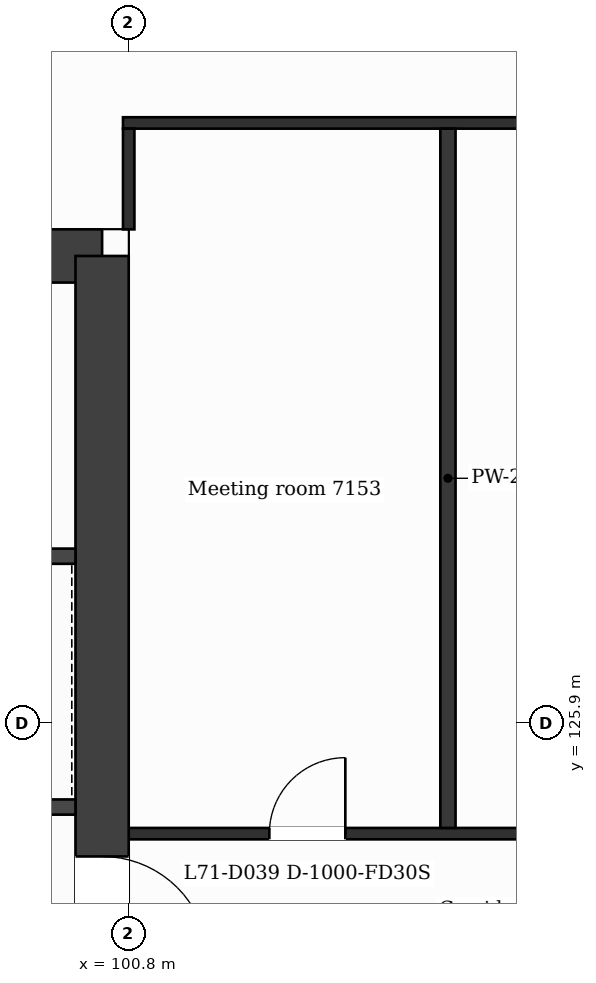
"""IFC4 building model, lengths in metres.
Left out: names, types, materials, properties, quantities, classifications, styles, units other than length and angle.
Written with IfcOpenShell. Run it as: python <this file> out.ifc"""

import sys

from ifc_helpers import new_model, si_unit, direction, frame, frame_2d, origin, place, context, subcontext, project, spatial, rectangle, extrude, element, fill, save


model = new_model("IFC4")
c1 = context("Model", 3, precision=1e-05, world=origin(), true_north=direction((0.0, 1.0)))
c2 = subcontext(c1, "Body", "Model", "MODEL_VIEW")
j1 = project(units=[si_unit("LENGTHUNIT", "METRE"), si_unit("PLANEANGLEUNIT", "RADIAN")], contexts=[c1])
p1 = place(None, origin())
s1 = spatial("IfcSite", under=j1, at=p1, CompositionType="ELEMENT")
p2 = place(p1, origin())
s2 = spatial("IfcBuilding", under=s1, at=p2, CompositionType="ELEMENT")
p3 = place(p2, frame((0.0, 0.0, 292.3)))
s3 = spatial("IfcBuildingStorey", under=s2, at=p3, CompositionType="ELEMENT", Elevation=292.3)
p4 = place(p3, frame((88.937, 132.05, 0.0), z_axis=(0.0, 0.0, 1.0), x_axis=(1.0, 0.0, 0.0)))
e1 = element("IfcWall", 1, at=p4, inside=s3, PredefinedType="SHEAR", context=c2, shape_type="SweptSolid", body=[
    extrude(rectangle(XDim=11.513, YDim=0.7, at=frame_2d((5.757, 0.0))), origin(), (0.0, 0.0, 1.0), 3.7),
])
p5 = place(p4, frame((6.927, 0.0, 0.0)))
e2 = element("IfcOpeningElement", 2, at=p5, cuts=e1, PredefinedType="OPENING", context=c2, shape_type="SweptSolid", body=[
    extrude(rectangle(XDim=1.2, YDim=2.1, at=frame_2d((0.6, 1.05))), frame((0.0, 0.36, 0.0), z_axis=(0.0, -1.0, 0.0), x_axis=(1.0, 0.0, 0.0)), (0.0, 0.0, 1.0), 0.72),
])
p6 = place(p3, frame((100.45, 132.05, 0.0), z_axis=(0.0, 0.0, 1.0), x_axis=(0.0, -1.0, 0.0)))
e3 = element("IfcWall", 3, at=p6, inside=s3, PredefinedType="SHEAR", context=c2, shape_type="SweptSolid", body=[
    extrude(rectangle(XDim=15.7, YDim=0.7, at=frame_2d((7.85, 0.0))), origin(), (0.0, 0.0, 1.0), 3.7),
])
p7 = place(p6, frame((7.9, 0.0, 0.0)))
e4 = element("IfcOpeningElement", 4, at=p7, cuts=e3, PredefinedType="OPENING", context=c2, shape_type="SweptSolid", body=[
    extrude(rectangle(XDim=1.4, YDim=2.1, at=frame_2d((0.7, 1.05))), frame((0.0, 0.36, 0.0), z_axis=(0.0, -1.0, 0.0), x_axis=(1.0, 0.0, 0.0)), (0.0, 0.0, 1.0), 0.72),
])
p8 = place(p3, frame((100.8, 124.45, 0.0), z_axis=(0.0, 0.0, 1.0), x_axis=(1.0, 0.0, 0.0)))
e5 = element("IfcWall", 5, at=p8, inside=s3, PredefinedType="PARTITIONING", context=c2, shape_type="SweptSolid", body=[
    extrude(rectangle(XDim=25.2, YDim=0.15, at=frame_2d((12.6, 0.0))), origin(), (0.0, 0.0, 1.0), 3.38),
])
p9 = place(p8, frame((1.85, 0.0, 0.0)))
e6 = element("IfcOpeningElement", 6, at=p9, cuts=e5, PredefinedType="OPENING", context=c2, shape_type="SweptSolid", body=[
    extrude(rectangle(XDim=1.0, YDim=2.1, at=frame_2d((0.5, 1.05))), frame((0.0, 0.085, 0.0), z_axis=(0.0, -1.0, 0.0), x_axis=(1.0, 0.0, 0.0)), (0.0, 0.0, 1.0), 0.17),
])
p10 = place(p8, frame((6.425, 0.0, 0.0)))
e7 = element("IfcOpeningElement", 7, at=p10, cuts=e5, PredefinedType="OPENING", context=c2, shape_type="SweptSolid", body=[
    extrude(rectangle(XDim=1.0, YDim=2.1, at=frame_2d((0.5, 1.05))), frame((0.0, 0.085, 0.0), z_axis=(0.0, -1.0, 0.0), x_axis=(1.0, 0.0, 0.0)), (0.0, 0.0, 1.0), 0.17),
])
p11 = place(p8, frame((9.4, 0.0, 0.0)))
e8 = element("IfcOpeningElement", 8, at=p11, cuts=e5, PredefinedType="OPENING", context=c2, shape_type="SweptSolid", body=[
    extrude(rectangle(XDim=1.0, YDim=2.1, at=frame_2d((0.5, 1.05))), frame((0.0, 0.085, 0.0), z_axis=(0.0, -1.0, 0.0), x_axis=(1.0, 0.0, 0.0)), (0.0, 0.0, 1.0), 0.17),
])
p12 = place(p8, frame((14.825, 0.0, 0.0)))
e9 = element("IfcOpeningElement", 9, at=p12, cuts=e5, PredefinedType="OPENING", context=c2, shape_type="SweptSolid", body=[
    extrude(rectangle(XDim=1.0, YDim=2.1, at=frame_2d((0.5, 1.05))), frame((0.0, 0.085, 0.0), z_axis=(0.0, -1.0, 0.0), x_axis=(1.0, 0.0, 0.0)), (0.0, 0.0, 1.0), 0.17),
])
p13 = place(p8, frame((18.825, 0.0, 0.0)))
e10 = element("IfcOpeningElement", 10, at=p13, cuts=e5, PredefinedType="OPENING", context=c2, shape_type="SweptSolid", body=[
    extrude(rectangle(XDim=1.0, YDim=2.1, at=frame_2d((0.5, 1.05))), frame((0.0, 0.085, 0.0), z_axis=(0.0, -1.0, 0.0), x_axis=(1.0, 0.0, 0.0)), (0.0, 0.0, 1.0), 0.17),
])
p14 = place(p3, frame((92.702, 124.8, 0.0), z_axis=(0.0, 0.0, 1.0), x_axis=(1.0, 0.0, 0.0)))
e11 = element("IfcWall", 11, at=p14, inside=s3, PredefinedType="PARTITIONING", context=c2, shape_type="SweptSolid", body=[
    extrude(rectangle(XDim=7.398, YDim=0.2, at=frame_2d((3.699, 0.0))), origin(), (0.0, 0.0, 1.0), 3.38),
])
p15 = place(p14, frame((5.48, 0.0, 0.0)))
e12 = element("IfcOpeningElement", 12, at=p15, cuts=e11, PredefinedType="OPENING", context=c2, shape_type="SweptSolid", body=[
    extrude(rectangle(XDim=1.1, YDim=2.1, at=frame_2d((0.55, 1.05))), frame((0.0, 0.11, 0.0), z_axis=(0.0, -1.0, 0.0), x_axis=(1.0, 0.0, 0.0)), (0.0, 0.0, 1.0), 0.22),
])
p16 = place(p3, frame((92.827, 128.1, 0.0), z_axis=(0.0, 0.0, 1.0), x_axis=(1.0, 0.0, 0.0)))
e13 = element("IfcWall", 13, at=p16, inside=s3, PredefinedType="PARTITIONING", context=c2, shape_type="SweptSolid", body=[
    extrude(rectangle(XDim=7.273, YDim=0.2, at=frame_2d((3.637, 0.0))), origin(), (0.0, 0.0, 1.0), 3.38),
])
p17 = place(p16, frame((3.086, 0.0, 0.0)))
e14 = element("IfcOpeningElement", 14, at=p17, cuts=e13, PredefinedType="OPENING", context=c2, shape_type="SweptSolid", body=[
    extrude(rectangle(XDim=1.1, YDim=2.1, at=frame_2d((0.55, 1.05))), frame((0.0, 0.11, 0.0), z_axis=(0.0, -1.0, 0.0), x_axis=(1.0, 0.0, 0.0)), (0.0, 0.0, 1.0), 0.22),
])
p18 = place(p3, frame((100.725, 133.8, 0.0), z_axis=(0.0, 0.0, 1.0), x_axis=(1.0, 0.0, 0.0)))
e15 = element("IfcWall", 15, at=p18, inside=s3, PredefinedType="PARTITIONING", context=c2, shape_type="SweptSolid", body=[
    extrude(rectangle(XDim=25.35, YDim=0.15, at=frame_2d((12.675, 0.0))), origin(), (0.0, 0.0, 1.0), 3.38),
])
p19 = place(p18, frame((9.825, 0.0, 0.0)))
e16 = element("IfcOpeningElement", 16, at=p19, cuts=e15, PredefinedType="OPENING", context=c2, shape_type="SweptSolid", body=[
    extrude(rectangle(XDim=1.0, YDim=2.1, at=frame_2d((0.5, 1.05))), frame((0.0, 0.085, 0.0), z_axis=(0.0, -1.0, 0.0), x_axis=(1.0, 0.0, 0.0)), (0.0, 0.0, 1.0), 0.17),
])
p20 = place(p3, frame((100.8, 132.4, 0.0), z_axis=(0.0, 0.0, 1.0), x_axis=(0.0, 1.0, 0.0)))
e17 = element("IfcWall", 17, at=p20, inside=s3, PredefinedType="PARTITIONING", context=c2, shape_type="SweptSolid", body=[
    extrude(rectangle(XDim=1.325, YDim=0.15, at=frame_2d((0.663, 0.0))), origin(), (0.0, 0.0, 1.0), 3.38),
])
p21 = place(p3, frame((105.0, 124.525, 0.0), z_axis=(0.0, 0.0, 1.0), x_axis=(0.0, 1.0, 0.0)))
e18 = element("IfcWall", 18, at=p21, inside=s3, PredefinedType="PARTITIONING", context=c2, shape_type="SweptSolid", body=[
    extrude(rectangle(XDim=9.2, YDim=0.2, at=frame_2d((4.6, 0.0))), origin(), (0.0, 0.0, 1.0), 3.38),
])
p22 = place(p9, origin())
e19 = element("IfcDoor", 19, at=p22, inside=s3, OperationType="SINGLE_SWING_RIGHT", PredefinedType="DOOR", context=c2, shape_type="SweptSolid", body=[
    extrude(rectangle(XDim=1.0, YDim=2.1, at=frame_2d((0.5, 1.05))), frame((0.0, 0.025, 0.0), z_axis=(0.0, -1.0, 0.0), x_axis=(1.0, 0.0, 0.0)), (0.0, 0.0, 1.0), 0.05),
])
fill(e6, e19)
p23 = place(p7, origin())
e20 = element("IfcDoor", 20, at=p23, inside=s3, OperationType="SINGLE_SWING_RIGHT", PredefinedType="DOOR", context=c2, shape_type="SweptSolid", body=[
    extrude(rectangle(XDim=1.4, YDim=2.1, at=frame_2d((0.7, 1.05))), frame((0.0, 0.025, 0.0), z_axis=(0.0, -1.0, 0.0), x_axis=(1.0, 0.0, 0.0)), (0.0, 0.0, 1.0), 0.05),
])
fill(e4, e20)
save(model, sys.argv[1])
